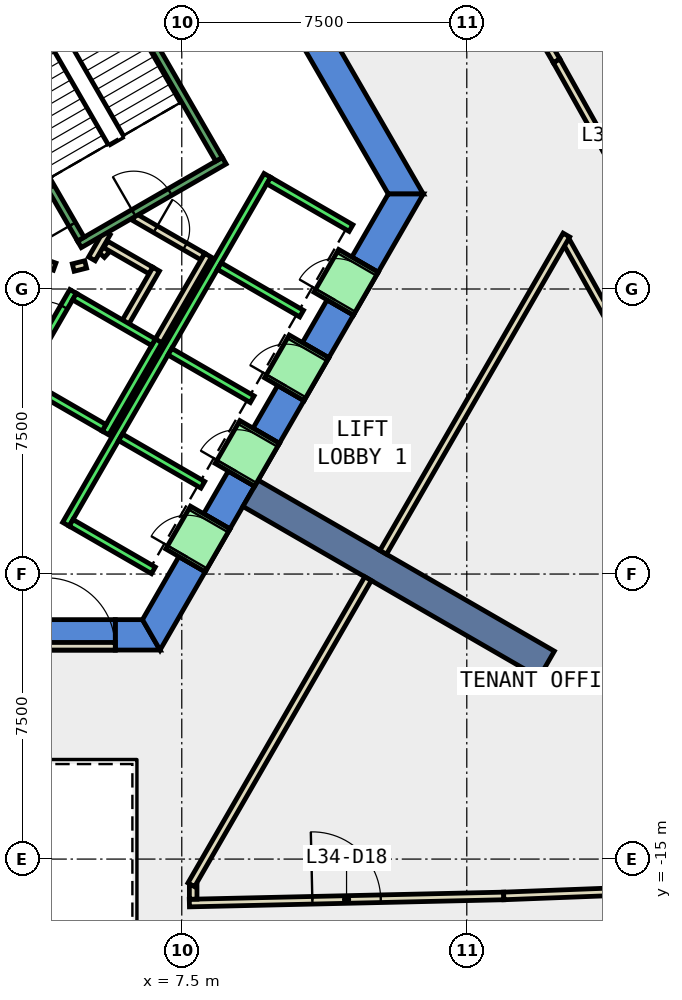
"""IFC4 building model, lengths in metres.
Left out: names, types, materials, properties, quantities, classifications, styles, units other than length and angle.
Written with IfcOpenShell. Run it as: python <this file> out.ifc"""

import sys

from ifc_helpers import new_model, si_unit, direction, frame, frame_2d, origin, place, context, subcontext, project, spatial, polyline, rectangle, outline, extrude, element, fill, save


model = new_model("IFC4")
c1 = context("Model", 3, precision=1e-05, world=origin(), true_north=direction((0.0, 1.0)))
c2 = subcontext(c1, "Body", "Model", "MODEL_VIEW")
j1 = project(units=[si_unit("LENGTHUNIT", "METRE"), si_unit("PLANEANGLEUNIT", "RADIAN")], contexts=[c1])
p1 = place(None, origin())
s1 = spatial("IfcSite", under=j1, at=p1, CompositionType="ELEMENT")
p2 = place(p1, origin())
s2 = spatial("IfcBuilding", under=s1, at=p2, CompositionType="ELEMENT")
p3 = place(p2, frame((0.0, 0.0, 155.0)))
s3 = spatial("IfcBuildingStorey", under=s2, at=p3, CompositionType="ELEMENT", Elevation=155.0)
p4 = place(p3, frame((0.0, 0.0, -0.4)))
e1 = element("IfcWall", 1, at=p4, inside=s3, PredefinedType="SHEAR", context=c2, shape_type="SweptSolid", body=[
    extrude(outline(polyline([(8.517, 11.748), (7.824, 11.348), (12.933, 2.5), (13.856, 2.5), (8.517, 11.748)])), origin(), (0.0, 0.0, 1.0), 4.2),
])
p5 = place(p3, frame((0.0, 0.0, -0.4)))
e2 = element("IfcWall", 2, at=p5, inside=s3, PredefinedType="SHEAR", context=c2, shape_type="SweptSolid", body=[
    extrude(outline(polyline([(5.75, -8.7), (5.75, -9.5), (6.928, -9.5), (6.466, -8.7), (5.75, -8.7)])), origin(), (0.0, 0.0, 1.0), 4.2),
])
p6 = place(p3, frame((0.0, 0.0, 3.6)))
e3 = element("IfcWall", 3, at=p6, inside=s3, PredefinedType="SHEAR", context=c2, shape_type="SweptSolid", body=[
    extrude(outline(polyline([(5.75, -9.5), (5.75, -8.7), (3.75, -8.7), (3.75, -9.5), (5.75, -9.5)])), origin(), (0.0, 0.0, 1.0), 0.2),
])
p7 = place(p3, frame((0.0, 0.0, -0.4)))
e4 = element("IfcWall", 4, at=p7, inside=s3, PredefinedType="SHEAR", context=c2, shape_type="SweptSolid", body=[
    extrude(outline(polyline([(8.117, -7.44), (7.424, -7.04), (6.466, -8.7), (6.928, -9.5), (8.117, -7.44)])), origin(), (0.0, 0.0, 1.0), 4.2),
])
p8 = place(p3, frame((0.0, 0.0, -0.4)))
e5 = element("IfcWall", 5, at=p8, inside=s3, PredefinedType="SHEAR", context=c2, shape_type="SweptSolid", body=[
    extrude(outline(polyline([(9.417, -5.189), (8.724, -4.789), (8.075, -5.914), (8.767, -6.314), (9.417, -5.189)])), origin(), (0.0, 0.0, 1.0), 4.2),
])
p9 = place(p3, frame((0.0, 0.0, -0.4)))
e6 = element("IfcWall", 6, at=p9, inside=s3, PredefinedType="SHEAR", context=c2, shape_type="SweptSolid", body=[
    extrude(outline(polyline([(10.717, -2.937), (10.025, -2.537), (9.374, -3.663), (10.067, -4.063), (10.717, -2.937)])), origin(), (0.0, 0.0, 1.0), 4.2),
])
p10 = place(p3, frame((0.0, 0.0, -0.4)))
e7 = element("IfcWall", 7, at=p10, inside=s3, PredefinedType="SHEAR", context=c2, shape_type="SweptSolid", body=[
    extrude(outline(polyline([(12.017, -0.686), (11.324, -0.286), (10.675, -1.411), (11.367, -1.811), (12.017, -0.686)])), origin(), (0.0, 0.0, 1.0), 4.2),
])
p11 = place(p3, frame((0.0, 0.0, -0.4)))
e8 = element("IfcWall", 8, at=p11, inside=s3, PredefinedType="SHEAR", context=c2, shape_type="SweptSolid", body=[
    extrude(outline(polyline([(11.974, 0.84), (12.667, 0.44), (13.856, 2.5), (12.933, 2.5), (11.974, 0.84)])), origin(), (0.0, 0.0, 1.0), 4.2),
])
p12 = place(p3, frame((0.0, 0.0, 3.6)))
e9 = element("IfcWall", 9, at=p12, inside=s3, PredefinedType="SHEAR", context=c2, shape_type="SweptSolid", body=[
    extrude(outline(polyline([(8.767, -6.314), (8.075, -5.914), (7.424, -7.04), (8.117, -7.44), (8.767, -6.314)])), origin(), (0.0, 0.0, 1.0), 0.2),
])
p13 = place(p3, frame((0.0, 0.0, 3.6)))
e10 = element("IfcWall", 10, at=p13, inside=s3, PredefinedType="SHEAR", context=c2, shape_type="SweptSolid", body=[
    extrude(outline(polyline([(10.067, -4.063), (9.374, -3.663), (8.724, -4.789), (9.417, -5.189), (10.067, -4.063)])), origin(), (0.0, 0.0, 1.0), 0.2),
])
p14 = place(p3, frame((0.0, 0.0, 3.6)))
e11 = element("IfcWall", 11, at=p14, inside=s3, PredefinedType="SHEAR", context=c2, shape_type="SweptSolid", body=[
    extrude(outline(polyline([(11.367, -1.811), (10.675, -1.411), (10.025, -2.537), (10.717, -2.937), (11.367, -1.811)])), origin(), (0.0, 0.0, 1.0), 0.2),
])
p15 = place(p3, frame((0.0, 0.0, 3.6)))
e12 = element("IfcWall", 12, at=p15, inside=s3, PredefinedType="SHEAR", context=c2, shape_type="SweptSolid", body=[
    extrude(outline(polyline([(12.667, 0.44), (11.974, 0.84), (11.324, -0.286), (12.017, -0.686), (12.667, 0.44)])), origin(), (0.0, 0.0, 1.0), 0.2),
])
p16 = place(p3, frame((9.31, -5.375, -0.4), z_axis=(0.0, 0.0, 1.0), x_axis=(0.866017533419, -0.500013631625, 0.0)))
e13 = element("IfcWall", 13, at=p16, inside=s3, PredefinedType="SHEAR", context=c2, shape_type="SweptSolid", body=[
    extrude(rectangle(XDim=9.0, YDim=0.8, at=frame_2d((4.5, 0.0))), origin(), (0.0, 0.0, 1.0), 4.2),
])
p17 = place(p3, frame((7.7, -16.157, 0.0), z_axis=(0.0, 0.0, 1.0), x_axis=(0.999744539931, 0.022602098978, 0.0)))
e14 = element("IfcWall", 14, at=p17, inside=s3, PredefinedType="PARTITIONING", context=c2, shape_type="SweptSolid", body=[
    extrude(rectangle(XDim=8.274, YDim=0.2, at=frame_2d((4.137, 0.0))), origin(), (0.0, 0.0, 1.0), 3.8),
])
p18 = place(p17, frame((3.237, 0.0, 0.0)))
e15 = element("IfcOpeningElement", 15, at=p18, cuts=e14, PredefinedType="OPENING", context=c2, shape_type="SweptSolid", body=[
    extrude(rectangle(XDim=1.8, YDim=2.1, at=frame_2d((0.9, 1.05))), frame((0.0, 0.11, 0.0), z_axis=(0.0, -1.0, 0.0), x_axis=(1.0, 0.0, 0.0)), (0.0, 0.0, 1.0), 0.22),
])
p19 = place(p3, frame((15.972, -15.97, 0.0), z_axis=(0.0, 0.0, 1.0), x_axis=(0.999262695969, 0.038393546916, 0.0)))
e16 = element("IfcWall", 16, at=p19, inside=s3, PredefinedType="PARTITIONING", context=c2, shape_type="SweptSolid", body=[
    extrude(rectangle(XDim=7.344, YDim=0.2, at=frame_2d((3.672, 0.0))), origin(), (0.0, 0.0, 1.0), 3.8),
])
p20 = place(p3, frame((18.93, -1.095, 0.0), z_axis=(0.0, 0.0, 1.0), x_axis=(-0.488268004118, 0.872693735599, 0.0)))
e17 = element("IfcWall", 17, at=p20, inside=s3, PredefinedType="PARTITIONING", context=c2, shape_type="SweptSolid", body=[
    extrude(rectangle(XDim=2.683, YDim=0.2, at=frame_2d((1.341, 0.0))), origin(), (0.0, 0.0, 1.0), 3.8),
])
p21 = place(p3, frame((15.659, 8.954, 0.0), z_axis=(0.0, 0.0, 1.0), x_axis=(0.50001992892, -0.866013897511, 0.0)))
e18 = element("IfcWall", 18, at=p21, inside=s3, PredefinedType="PARTITIONING", context=c2, shape_type="SweptSolid", body=[
    extrude(rectangle(XDim=3.41, YDim=0.2, at=frame_2d((1.705, 0.0))), origin(), (0.0, 0.0, 1.0), 3.8),
])
p22 = place(p3, frame((17.364, 6.001, 0.0), z_axis=(0.0, 0.0, 1.0), x_axis=(0.488528981592, -0.872547668695, 0.0)))
e19 = element("IfcWall", 19, at=p22, inside=s3, PredefinedType="PARTITIONING", context=c2, shape_type="SweptSolid", body=[
    extrude(rectangle(XDim=6.896, YDim=0.2, at=frame_2d((3.448, 0.0))), origin(), (0.0, 0.0, 1.0), 3.8),
])
p23 = place(p22, frame((3.023, 0.0, 0.0)))
e20 = element("IfcOpeningElement", 20, at=p23, cuts=e19, PredefinedType="OPENING", context=c2, shape_type="SweptSolid", body=[
    extrude(rectangle(XDim=1.0, YDim=2.1, at=frame_2d((0.5, 1.05))), frame((0.0, 0.11, 0.0), z_axis=(0.0, -1.0, 0.0), x_axis=(1.0, 0.0, 0.0)), (0.0, 0.0, 1.0), 0.22),
])
p24 = place(p3, frame((5.39, 0.898, 0.0), z_axis=(0.0, 0.0, 1.0), x_axis=(0.673828488714, 0.738887791073, 0.0)))
e21 = element("IfcWall", 21, at=p24, inside=s3, PredefinedType="PARTITIONING", context=c2, shape_type="SweptSolid", body=[
    extrude(rectangle(XDim=0.263, YDim=0.2, at=frame_2d((0.131, 0.0))), origin(), (0.0, 0.0, 1.0), 3.8),
])
p25 = place(p3, frame((5.499, 1.172, 0.0), z_axis=(0.0, 0.0, 1.0), x_axis=(0.866333505267, -0.499465972466, 0.0)))
e22 = element("IfcWall", 22, at=p25, inside=s3, PredefinedType="PARTITIONING", context=c2, shape_type="SweptSolid", body=[
    extrude(rectangle(XDim=1.374, YDim=0.2, at=frame_2d((0.687, 0.0))), origin(), (0.0, 0.0, 1.0), 3.8),
])
p26 = place(p3, frame((6.826, 0.522, 0.0), z_axis=(0.0, 0.0, 1.0), x_axis=(-0.500016722714, -0.866015748706, 0.0)))
e23 = element("IfcWall", 23, at=p26, inside=s3, PredefinedType="PARTITIONING", context=c2, shape_type="SweptSolid", body=[
    extrude(rectangle(XDim=1.7, YDim=0.2, at=frame_2d((0.85, 0.0))), origin(), (0.0, 0.0, 1.0), 3.8),
])
p27 = place(p3, frame((6.25, 1.894, 0.0), z_axis=(0.0, 0.0, 1.0), x_axis=(0.866043184279, -0.499969202016, 0.0)))
e24 = element("IfcWall", 24, at=p27, inside=s3, PredefinedType="PARTITIONING", context=c2, shape_type="SweptSolid", body=[
    extrude(rectangle(XDim=2.084, YDim=0.2, at=frame_2d((1.042, 0.0))), origin(), (0.0, 0.0, 1.0), 3.8),
])
p28 = place(p27, frame((0.642, 0.0, 0.0)))
e25 = element("IfcOpeningElement", 25, at=p28, cuts=e24, PredefinedType="OPENING", context=c2, shape_type="SweptSolid", body=[
    extrude(rectangle(XDim=0.9, YDim=2.1, at=frame_2d((0.45, 1.05))), frame((0.0, 0.11, 0.0), z_axis=(0.0, -1.0, 0.0), x_axis=(1.0, 0.0, 0.0)), (0.0, 0.0, 1.0), 0.22),
])
p29 = place(p3, frame((8.192, 0.888, 0.0), z_axis=(0.0, 0.0, 1.0), x_axis=(-0.499940625693, -0.866059680843, 0.0)))
e26 = element("IfcWall", 26, at=p29, inside=s3, PredefinedType="PARTITIONING", context=c2, shape_type="SweptSolid", body=[
    extrude(rectangle(XDim=2.68, YDim=0.2, at=frame_2d((1.34, 0.0))), origin(), (0.0, 0.0, 1.0), 3.8),
])
p30 = place(p3, frame((5.135, 0.793, 0.0), z_axis=(0.0, 0.0, 1.0), x_axis=(0.499526442893, 0.866298639529, 0.0)))
e27 = element("IfcWall", 27, at=p30, inside=s3, PredefinedType="PARTITIONING", context=c2, shape_type="SweptSolid", body=[
    extrude(rectangle(XDim=0.791, YDim=0.2, at=frame_2d((0.396, 0.0))), origin(), (0.0, 0.0, 1.0), 3.8),
])
p31 = place(p3, frame((3.838, 0.702, 0.0), z_axis=(0.0, 0.0, 1.0), x_axis=(0.941035081519, -0.338308993895, 0.0)))
e28 = element("IfcWall", 28, at=p31, inside=s3, PredefinedType="PARTITIONING", context=c2, shape_type="SweptSolid", body=[
    extrude(rectangle(XDim=0.337, YDim=0.2, at=frame_2d((0.168, 0.0))), origin(), (0.0, 0.0, 1.0), 3.8),
])
p32 = place(p3, frame((4.644, 0.564, 0.0), z_axis=(0.0, 0.0, 1.0), x_axis=(0.969929076366, 0.243387729394, 0.0)))
e29 = element("IfcWall", 29, at=p32, inside=s3, PredefinedType="PARTITIONING", context=c2, shape_type="SweptSolid", body=[
    extrude(rectangle(XDim=0.337, YDim=0.2, at=frame_2d((0.168, 0.0))), origin(), (0.0, 0.0, 1.0), 3.8),
])
p33 = place(p3, frame((7.8, -15.69, 0.0), z_axis=(0.0, 0.0, 1.0), x_axis=(0.0, -1.0, 0.0)))
e30 = element("IfcWall", 30, at=p33, inside=s3, PredefinedType="PARTITIONING", context=c2, shape_type="SweptSolid", body=[
    extrude(rectangle(XDim=0.365, YDim=0.2, at=frame_2d((0.183, 0.0))), origin(), (0.0, 0.0, 1.0), 3.8),
])
p34 = place(p3, frame((17.621, 1.42, 0.0), z_axis=(0.0, 0.0, 1.0), x_axis=(-0.499987708133, -0.866032500381, 0.0)))
e31 = element("IfcWall", 31, at=p34, inside=s3, PredefinedType="PARTITIONING", context=c2, shape_type="SweptSolid", body=[
    extrude(rectangle(XDim=9.64, YDim=0.2, at=frame_2d((4.82, 0.0))), origin(), (0.0, 0.0, 1.0), 3.8),
])
p35 = place(p3, frame((3.75, -9.4, 0.0), z_axis=(0.0, 0.0, 1.0), x_axis=(1.0, 0.0, 0.0)))
e32 = element("IfcWall", 32, at=p35, inside=s3, PredefinedType="PARTITIONING", context=c2, shape_type="SweptSolid", body=[
    extrude(rectangle(XDim=2.0, YDim=0.2, at=frame_2d((1.0, 0.0))), origin(), (0.0, 0.0, 1.0), 2.4),
])
p36 = place(p35, frame((0.19, 0.0, 0.0)))
e33 = element("IfcOpeningElement", 33, at=p36, cuts=e32, PredefinedType="OPENING", context=c2, shape_type="SweptSolid", body=[
    extrude(rectangle(XDim=1.8, YDim=2.1, at=frame_2d((0.9, 1.05))), frame((0.0, 0.11, 0.0), z_axis=(0.0, -1.0, 0.0), x_axis=(1.0, 0.0, 0.0)), (0.0, 0.0, 1.0), 0.22),
])
p37 = place(p3, frame((12.401, -7.621, 0.0), z_axis=(0.0, 0.0, 1.0), x_axis=(-0.499983724212, -0.866034800411, 0.0)))
e34 = element("IfcWall", 34, at=p37, inside=s3, PredefinedType="PARTITIONING", context=c2, shape_type="SweptSolid", body=[
    extrude(rectangle(XDim=9.302, YDim=0.2, at=frame_2d((4.651, 0.0))), origin(), (0.0, 0.0, 1.0), 3.8),
])
p38 = place(p3, frame((3.24, -2.488, 0.0), z_axis=(0.0, 0.0, 1.0), x_axis=(0.49994636267, 0.866056369097, 0.0)))
e35 = element("IfcWall", 35, at=p38, inside=s3, PredefinedType="STANDARD", context=c2, shape_type="SweptSolid", body=[
    extrude(rectangle(XDim=2.8, YDim=0.2, at=frame_2d((1.4, 0.0))), origin(), (0.0, 0.0, 1.0), 3.8),
])
p39 = place(p38, frame((1.225, 0.0, 0.0)))
e36 = element("IfcOpeningElement", 36, at=p39, cuts=e35, PredefinedType="OPENING", context=c2, shape_type="SweptSolid", body=[
    extrude(rectangle(XDim=1.1, YDim=2.1, at=frame_2d((0.55, 1.05))), frame((0.0, 0.11, 0.0), z_axis=(0.0, -1.0, 0.0), x_axis=(1.0, 0.0, 0.0)), (0.0, 0.0, 1.0), 0.22),
])
p40 = place(p3, frame((5.492, -3.788, 0.0), z_axis=(0.0, 0.0, 1.0), x_axis=(0.500011755427, 0.866018616679, 0.0)))
e37 = element("IfcWall", 37, at=p40, inside=s3, PredefinedType="STANDARD", context=c2, shape_type="SweptSolid", body=[
    extrude(rectangle(XDim=2.8, YDim=0.2, at=frame_2d((1.4, 0.0))), origin(), (0.0, 0.0, 1.0), 3.8),
])
p41 = place(p3, frame((3.377, -2.452, 0.0), z_axis=(0.0, 0.0, 1.0), x_axis=(0.865955154139, -0.50012165622, 0.0)))
e38 = element("IfcWall", 38, at=p41, inside=s3, PredefinedType="STANDARD", context=c2, shape_type="SweptSolid", body=[
    extrude(rectangle(XDim=2.4, YDim=0.2, at=frame_2d((1.2, 0.0))), origin(), (0.0, 0.0, 1.0), 3.8),
])
p42 = place(p3, frame((4.677, -0.2, 0.0), z_axis=(0.0, 0.0, 1.0), x_axis=(0.865973769406, -0.500089422704, 0.0)))
e39 = element("IfcWall", 39, at=p42, inside=s3, PredefinedType="STANDARD", context=c2, shape_type="SweptSolid", body=[
    extrude(rectangle(XDim=2.399, YDim=0.2, at=frame_2d((1.2, 0.0))), origin(), (0.0, 0.0, 1.0), 3.8),
])
p43 = place(p3, frame((4.451, -6.19, 0.0), z_axis=(0.0, 0.0, 1.0), x_axis=(0.50000090737, 0.866024879913, 0.0)))
e40 = element("IfcWall", 40, at=p43, inside=s3, PredefinedType="STANDARD", context=c2, shape_type="SweptSolid", body=[
    extrude(rectangle(XDim=10.6, YDim=0.2, at=frame_2d((5.3, 0.0))), origin(), (0.0, 0.0, 1.0), 3.8),
])
for number, where, z_axis, x_axis in (
    (41, (4.588, -6.153, 0.0), (0.0, 0.0, 1.0), (0.866, -0.5, 0.0)),
    (42, (5.888, -3.902, 0.0), (0.0, 0.0, 1.0), (0.866, -0.5, 0.0)),
    (43, (7.188, -1.65, 0.0), (0.0, 0.0, 1.0), (0.866, -0.5, 0.0)),
    (44, (8.488, 0.602, 0.0), (0.0, 0.0, 1.0), (0.866, -0.5, 0.0)),
):
    element("IfcWall", number, at=place(p3, frame(where, z_axis=z_axis, x_axis=x_axis)), inside=s3, PredefinedType="STANDARD", context=c2, shape_type="SweptSolid", body=[
        extrude(rectangle(XDim=2.5, YDim=0.2, at=frame_2d((1.25, 0.0))), origin(), (0.0, 0.0, 1.0), 3.8),
    ])
p44 = place(p3, frame((9.788, 2.853, 0.0), z_axis=(0.0, 0.0, 1.0), x_axis=(0.865998541277, -0.500046524342, 0.0)))
e45 = element("IfcWall", 45, at=p44, inside=s3, PredefinedType="STANDARD", context=c2, shape_type="SweptSolid", body=[
    extrude(rectangle(XDim=2.5, YDim=0.2, at=frame_2d((1.25, 0.0))), origin(), (0.0, 0.0, 1.0), 3.8),
])
p45 = place(p3, frame((7.598, -7.14, 0.0), z_axis=(0.0, 0.0, 1.0), x_axis=(0.500362116554, 0.865816234728, 0.0)))
e46 = element("IfcWall", 46, at=p45, inside=s3, PredefinedType="STANDARD", context=c2, shape_type="SweptSolid", body=[
    extrude(rectangle(XDim=1.299, YDim=1.2, at=frame_2d((0.65, 0.0))), origin(), (0.0, 0.0, 1.0), 2.4),
])
p46 = place(p45, frame((0.1, 0.0, 0.0)))
e47 = element("IfcOpeningElement", 47, at=p46, cuts=e46, PredefinedType="OPENING", context=c2, shape_type="SweptSolid", body=[
    extrude(rectangle(XDim=1.1, YDim=2.3, at=frame_2d((0.55, 1.15))), frame((0.0, 0.61, 0.0), z_axis=(0.0, -1.0, 0.0), x_axis=(1.0, 0.0, 0.0)), (0.0, 0.0, 1.0), 1.22),
])
p47 = place(p3, frame((8.898, -4.889, 0.0), z_axis=(0.0, 0.0, 1.0), x_axis=(0.500036693733, 0.866004217611, 0.0)))
e48 = element("IfcWall", 48, at=p47, inside=s3, PredefinedType="STANDARD", context=c2, shape_type="SweptSolid", body=[
    extrude(rectangle(XDim=1.3, YDim=1.2, at=frame_2d((0.65, 0.0))), origin(), (0.0, 0.0, 1.0), 2.4),
])
p48 = place(p47, frame((0.1, 0.0, 0.0)))
e49 = element("IfcOpeningElement", 49, at=p48, cuts=e48, PredefinedType="OPENING", context=c2, shape_type="SweptSolid", body=[
    extrude(rectangle(XDim=1.1, YDim=2.3, at=frame_2d((0.55, 1.15))), frame((0.0, 0.61, 0.0), z_axis=(0.0, -1.0, 0.0), x_axis=(1.0, 0.0, 0.0)), (0.0, 0.0, 1.0), 1.22),
])
p49 = place(p3, frame((10.198, -2.637, 0.0), z_axis=(0.0, 0.0, 1.0), x_axis=(0.49989585183, 0.866085525409, 0.0)))
e50 = element("IfcWall", 50, at=p49, inside=s3, PredefinedType="STANDARD", context=c2, shape_type="SweptSolid", body=[
    extrude(rectangle(XDim=1.3, YDim=1.2, at=frame_2d((0.65, 0.0))), origin(), (0.0, 0.0, 1.0), 2.4),
])
p50 = place(p49, frame((0.1, 0.0, 0.0)))
e51 = element("IfcOpeningElement", 51, at=p50, cuts=e50, PredefinedType="OPENING", context=c2, shape_type="SweptSolid", body=[
    extrude(rectangle(XDim=1.1, YDim=2.3, at=frame_2d((0.55, 1.15))), frame((0.0, 0.61, 0.0), z_axis=(0.0, -1.0, 0.0), x_axis=(1.0, 0.0, 0.0)), (0.0, 0.0, 1.0), 1.22),
])
p51 = place(p3, frame((11.498, -0.385, 0.0), z_axis=(0.0, 0.0, 1.0), x_axis=(0.500221244143, 0.865897630733, 0.0)))
e52 = element("IfcWall", 52, at=p51, inside=s3, PredefinedType="STANDARD", context=c2, shape_type="SweptSolid", body=[
    extrude(rectangle(XDim=1.299, YDim=1.2, at=frame_2d((0.65, 0.0))), origin(), (0.0, 0.0, 1.0), 2.4),
])
p52 = place(p51, frame((0.1, 0.0, 0.0)))
e53 = element("IfcOpeningElement", 53, at=p52, cuts=e52, PredefinedType="OPENING", context=c2, shape_type="SweptSolid", body=[
    extrude(rectangle(XDim=1.1, YDim=2.3, at=frame_2d((0.55, 1.15))), frame((0.0, 0.61, 0.0), z_axis=(0.0, -1.0, 0.0), x_axis=(1.0, 0.0, 0.0)), (0.0, 0.0, 1.0), 1.22),
])
p53 = place(p3, frame((4.806, 1.176, 0.0), z_axis=(0.0, 0.0, 1.0), x_axis=(0.866059941101, 0.499940174841, 0.0)))
e54 = element("IfcWall", 54, at=p53, inside=s3, PredefinedType="STANDARD", context=c2, shape_type="SweptSolid", body=[
    extrude(rectangle(XDim=4.4, YDim=0.2, at=frame_2d((2.2, 0.0))), origin(), (0.0, 0.0, 1.0), 3.8),
])
p54 = place(p53, frame((1.65, 0.0, 0.0)))
e55 = element("IfcOpeningElement", 55, at=p54, cuts=e54, PredefinedType="OPENING", context=c2, shape_type="SweptSolid", body=[
    extrude(rectangle(XDim=1.1, YDim=2.2, at=frame_2d((0.55, 1.1))), frame((0.0, 0.11, 0.0), z_axis=(0.0, -1.0, 0.0), x_axis=(1.0, 0.0, 0.0)), (0.0, 0.0, 1.0), 0.22),
])
p55 = place(p3, frame((4.843, 1.312, 0.0), z_axis=(0.0, 0.0, 1.0), x_axis=(-0.499963383562, 0.866046543262, 0.0)))
e56 = element("IfcWall", 56, at=p55, inside=s3, PredefinedType="STANDARD", context=c2, shape_type="SweptSolid", body=[
    extrude(rectangle(XDim=6.9, YDim=0.2, at=frame_2d((3.45, 0.0))), origin(), (0.0, 0.0, 1.0), 3.8),
])
p56 = place(p55, frame((0.45, 0.0, 0.0)))
e57 = element("IfcOpeningElement", 57, at=p56, cuts=e56, PredefinedType="OPENING", context=c2, shape_type="SweptSolid", body=[
    extrude(rectangle(XDim=1.1, YDim=2.2, at=frame_2d((0.55, 1.1))), frame((0.0, 0.11, 0.0), z_axis=(0.0, -1.0, 0.0), x_axis=(1.0, 0.0, 0.0)), (0.0, 0.0, 1.0), 0.22),
])
p57 = place(p3, frame((8.48, 3.412, 0.0), z_axis=(0.0, 0.0, 1.0), x_axis=(-0.499978703459, 0.866037698999, 0.0)))
e58 = element("IfcWall", 58, at=p57, inside=s3, PredefinedType="STANDARD", context=c2, shape_type="SweptSolid", body=[
    extrude(rectangle(XDim=6.9, YDim=0.2, at=frame_2d((3.45, 0.0))), origin(), (0.0, 0.0, 1.0), 3.8),
])
p58 = place(p18, origin())
e59 = element("IfcDoor", 59, at=p58, inside=s3, OperationType="DOUBLE_DOOR_SINGLE_SWING", PredefinedType="DOOR", context=c2, shape_type="SweptSolid", body=[
    extrude(rectangle(XDim=1.8, YDim=2.1, at=frame_2d((0.9, 1.05))), frame((0.0, 0.025, 0.0), z_axis=(0.0, -1.0, 0.0), x_axis=(1.0, 0.0, 0.0)), (0.0, 0.0, 1.0), 0.05),
])
fill(e15, e59)
p59 = place(p28, origin())
e60 = element("IfcDoor", 60, at=p59, inside=s3, OperationType="SINGLE_SWING_LEFT", PredefinedType="DOOR", context=c2, shape_type="SweptSolid", body=[
    extrude(rectangle(XDim=0.9, YDim=2.1, at=frame_2d((0.45, 1.05))), frame((0.0, 0.025, 0.0), z_axis=(0.0, -1.0, 0.0), x_axis=(1.0, 0.0, 0.0)), (0.0, 0.0, 1.0), 0.05),
])
fill(e25, e60)
p60 = place(p36, origin())
e61 = element("IfcDoor", 61, at=p60, inside=s3, OperationType="DOUBLE_DOOR_SINGLE_SWING", PredefinedType="DOOR", context=c2, shape_type="SweptSolid", body=[
    extrude(rectangle(XDim=1.8, YDim=2.1, at=frame_2d((0.9, 1.05))), frame((0.0, 0.025, 0.0), z_axis=(0.0, -1.0, 0.0), x_axis=(1.0, 0.0, 0.0)), (0.0, 0.0, 1.0), 0.05),
])
fill(e33, e61)
p61 = place(p46, origin())
e62 = element("IfcDoor", 62, at=p61, inside=s3, OperationType="SLIDING_TO_LEFT", PredefinedType="DOOR", context=c2, shape_type="SweptSolid", body=[
    extrude(rectangle(XDim=1.1, YDim=2.3, at=frame_2d((0.55, 1.15))), frame((0.0, 0.025, 0.0), z_axis=(0.0, -1.0, 0.0), x_axis=(1.0, 0.0, 0.0)), (0.0, 0.0, 1.0), 0.05),
])
fill(e47, e62)
p62 = place(p48, origin())
e63 = element("IfcDoor", 63, at=p62, inside=s3, OperationType="SLIDING_TO_LEFT", PredefinedType="DOOR", context=c2, shape_type="SweptSolid", body=[
    extrude(rectangle(XDim=1.1, YDim=2.3, at=frame_2d((0.55, 1.15))), frame((0.0, 0.025, 0.0), z_axis=(0.0, -1.0, 0.0), x_axis=(1.0, 0.0, 0.0)), (0.0, 0.0, 1.0), 0.05),
])
fill(e49, e63)
p63 = place(p50, origin())
e64 = element("IfcDoor", 64, at=p63, inside=s3, OperationType="SLIDING_TO_LEFT", PredefinedType="DOOR", context=c2, shape_type="SweptSolid", body=[
    extrude(rectangle(XDim=1.1, YDim=2.3, at=frame_2d((0.55, 1.15))), frame((0.0, 0.025, 0.0), z_axis=(0.0, -1.0, 0.0), x_axis=(1.0, 0.0, 0.0)), (0.0, 0.0, 1.0), 0.05),
])
fill(e51, e64)
p64 = place(p52, origin())
e65 = element("IfcDoor", 65, at=p64, inside=s3, OperationType="SLIDING_TO_LEFT", PredefinedType="DOOR", context=c2, shape_type="SweptSolid", body=[
    extrude(rectangle(XDim=1.1, YDim=2.3, at=frame_2d((0.55, 1.15))), frame((0.0, 0.025, 0.0), z_axis=(0.0, -1.0, 0.0), x_axis=(1.0, 0.0, 0.0)), (0.0, 0.0, 1.0), 0.05),
])
fill(e53, e65)
p65 = place(p39, origin())
e66 = element("IfcDoor", 66, at=p65, inside=s3, OperationType="SLIDING_TO_LEFT", PredefinedType="DOOR", context=c2, shape_type="SweptSolid", body=[
    extrude(rectangle(XDim=1.1, YDim=2.1, at=frame_2d((0.55, 1.05))), frame((0.0, 0.025, 0.0), z_axis=(0.0, -1.0, 0.0), x_axis=(1.0, 0.0, 0.0)), (0.0, 0.0, 1.0), 0.05),
])
fill(e36, e66)
p66 = place(p56, origin())
e67 = element("IfcDoor", 67, at=p66, inside=s3, OperationType="SINGLE_SWING_LEFT", PredefinedType="DOOR", context=c2, shape_type="SweptSolid", body=[
    extrude(rectangle(XDim=1.1, YDim=2.2, at=frame_2d((0.55, 1.1))), frame((0.0, 0.025, 0.0), z_axis=(0.0, -1.0, 0.0), x_axis=(1.0, 0.0, 0.0)), (0.0, 0.0, 1.0), 0.05),
])
fill(e57, e67)
p67 = place(p54, origin())
e68 = element("IfcDoor", 68, at=p67, inside=s3, OperationType="SINGLE_SWING_LEFT", PredefinedType="DOOR", context=c2, shape_type="SweptSolid", body=[
    extrude(rectangle(XDim=1.1, YDim=2.2, at=frame_2d((0.55, 1.1))), frame((0.0, 0.025, 0.0), z_axis=(0.0, -1.0, 0.0), x_axis=(1.0, 0.0, 0.0)), (0.0, 0.0, 1.0), 0.05),
])
fill(e55, e68)
save(model, sys.argv[1])
